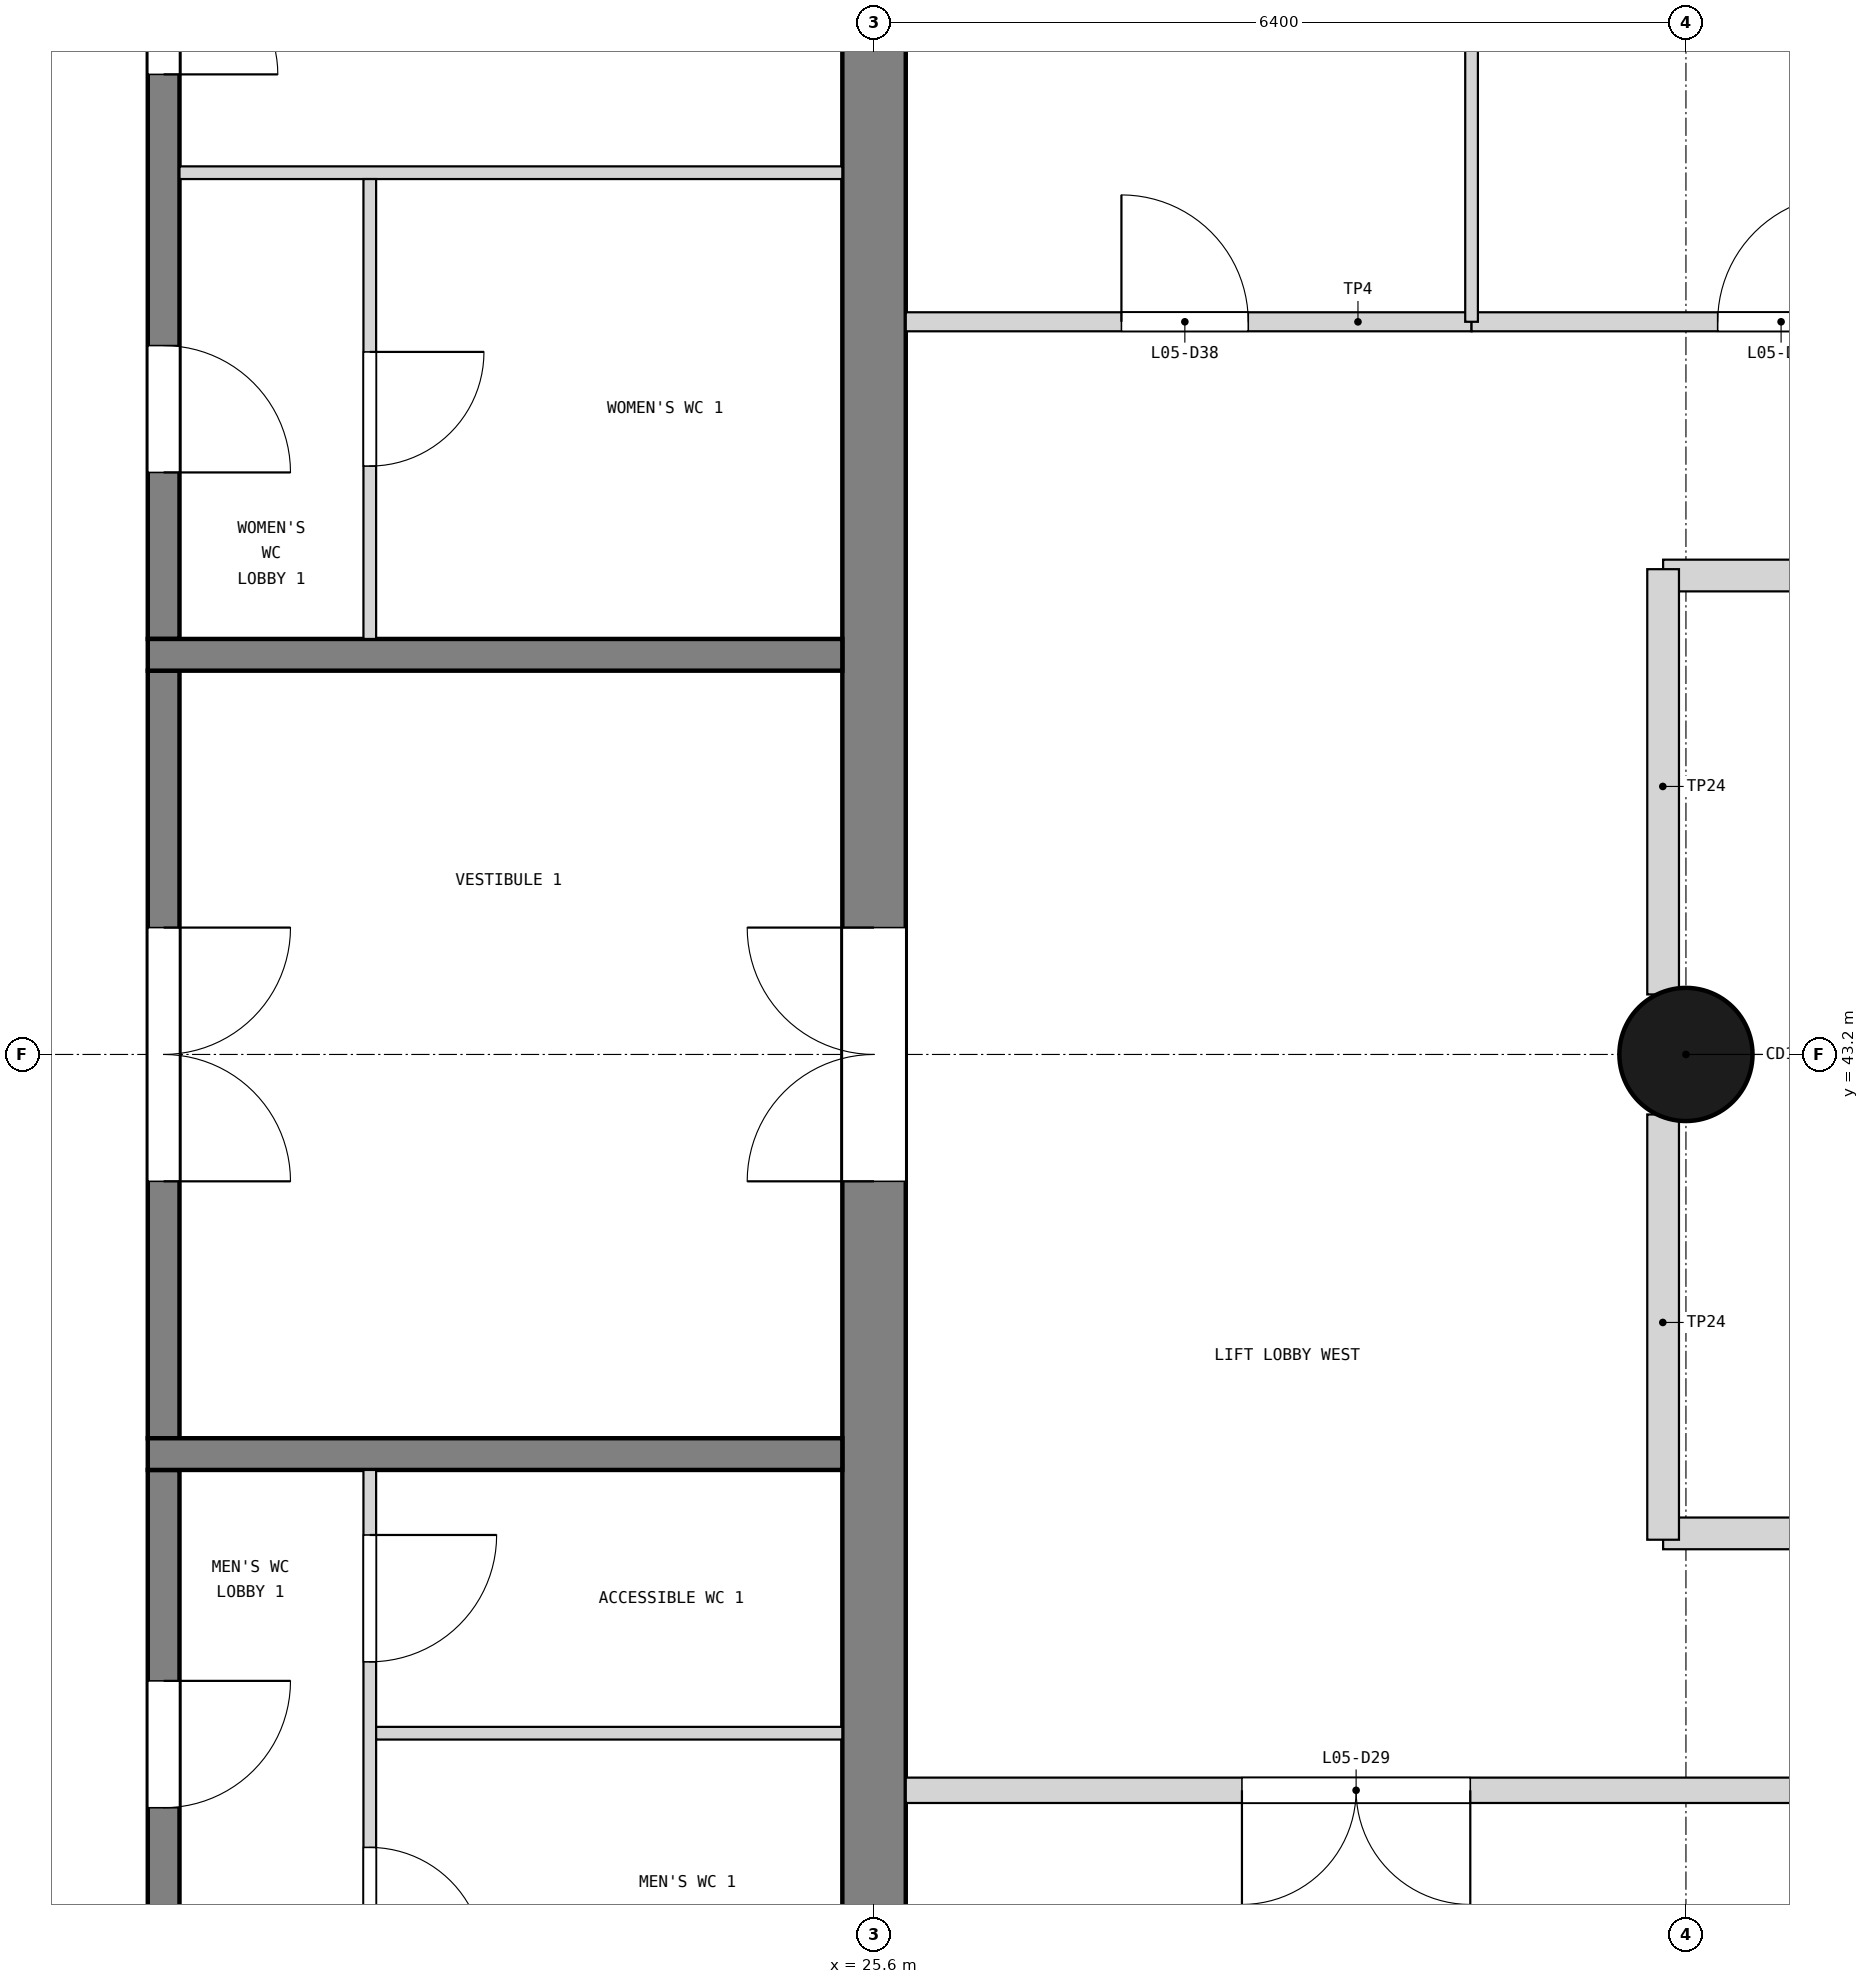
"""IFC4 building model, lengths in metres.
Left out: names, types, materials, properties, quantities, classifications, styles, units other than length and angle.
Written with IfcOpenShell. Run it as: python <this file> out.ifc"""

import sys

from ifc_helpers import new_model, si_unit, direction, frame, frame_2d, origin, origin_2d, place, context, subcontext, project, spatial, rectangle, circle, extrude, element, fill, save


model = new_model("IFC4")
c1 = context("Model", 3, precision=1e-05, world=origin(), true_north=direction((0.0, 1.0)))
c2 = subcontext(c1, "Body", "Model", "MODEL_VIEW")
j1 = project(units=[si_unit("LENGTHUNIT", "METRE"), si_unit("PLANEANGLEUNIT", "RADIAN")], contexts=[c1])
p1 = place(None, origin())
s1 = spatial("IfcSite", under=j1, at=p1, CompositionType="ELEMENT")
p2 = place(p1, origin())
s2 = spatial("IfcBuilding", under=s1, at=p2, CompositionType="ELEMENT")
p3 = place(p2, frame((0.0, 0.0, 21.0)))
s3 = spatial("IfcBuildingStorey", under=s2, at=p3, CompositionType="ELEMENT", Elevation=21.0)
p4 = place(p3, frame((25.6, 33.85, 0.0), z_axis=(0.0, 0.0, 1.0), x_axis=(0.0, 1.0, 0.0)))
e1 = element("IfcWall", 1, at=p4, inside=s3, PredefinedType="SHEAR", context=c2, shape_type="SweptSolid", body=[
    extrude(rectangle(XDim=18.7, YDim=0.5, at=frame_2d((9.35, 0.0))), origin(), (0.0, 0.0, 1.0), 3.9),
])
p5 = place(p4, frame((8.35, 0.0, 0.0)))
e2 = element("IfcOpeningElement", 2, at=p5, cuts=e1, PredefinedType="OPENING", context=c2, shape_type="SweptSolid", body=[
    extrude(rectangle(XDim=2.0, YDim=2.1, at=frame_2d((1.0, 1.05))), frame((0.0, 0.26, 0.0), z_axis=(0.0, -1.0, 0.0), x_axis=(1.0, 0.0, 0.0)), (0.0, 0.0, 1.0), 0.52),
])
p6 = place(p3, frame((32.0, 43.2, 0.0), z_axis=(0.0, 0.0, 1.0), x_axis=(1.0, 0.0, 0.0)))
e3 = element("IfcColumn", 3, at=p6, inside=s3, PredefinedType="COLUMN", context=c2, shape_type="SweptSolid", body=[
    extrude(circle(Radius=0.525, at=origin_2d()), origin(), (0.0, 0.0, 1.0), 3.9),
])
p7 = place(p3, frame((20.0, 33.85, 0.0), z_axis=(0.0, 0.0, 1.0), x_axis=(0.0, 1.0, 0.0)))
e4 = element("IfcWall", 4, at=p7, inside=s3, PredefinedType="SOLIDWALL", context=c2, shape_type="SweptSolid", body=[
    extrude(rectangle(XDim=6.075, YDim=0.25, at=frame_2d((3.038, 0.0))), origin(), (0.0, 0.0, 1.0), 3.6),
])
p8 = place(p7, frame((0.425, 0.0, 0.0)))
e5 = element("IfcOpeningElement", 5, at=p8, cuts=e4, PredefinedType="OPENING", context=c2, shape_type="SweptSolid", body=[
    extrude(rectangle(XDim=0.8, YDim=2.1, at=frame_2d((0.4, 1.05))), frame((0.0, 0.135, 0.0), z_axis=(0.0, -1.0, 0.0), x_axis=(1.0, 0.0, 0.0)), (0.0, 0.0, 1.0), 0.27),
])
p9 = place(p7, frame((3.413, 0.0, 0.0)))
e6 = element("IfcOpeningElement", 6, at=p9, cuts=e4, PredefinedType="OPENING", context=c2, shape_type="SweptSolid", body=[
    extrude(rectangle(XDim=1.0, YDim=2.1, at=frame_2d((0.5, 1.05))), frame((0.0, 0.135, 0.0), z_axis=(0.0, -1.0, 0.0), x_axis=(1.0, 0.0, 0.0)), (0.0, 0.0, 1.0), 0.27),
])
p10 = place(p3, frame((20.0, 40.175, 0.0), z_axis=(0.0, 0.0, 1.0), x_axis=(0.0, 1.0, 0.0)))
e7 = element("IfcWall", 7, at=p10, inside=s3, PredefinedType="SOLIDWALL", context=c2, shape_type="SweptSolid", body=[
    extrude(rectangle(XDim=6.05, YDim=0.25, at=frame_2d((3.025, 0.0))), origin(), (0.0, 0.0, 1.0), 3.6),
])
p11 = place(p10, frame((2.025, 0.0, 0.0)))
e8 = element("IfcOpeningElement", 8, at=p11, cuts=e7, PredefinedType="OPENING", context=c2, shape_type="SweptSolid", body=[
    extrude(rectangle(XDim=2.0, YDim=2.1, at=frame_2d((1.0, 1.05))), frame((0.0, 0.135, 0.0), z_axis=(0.0, -1.0, 0.0), x_axis=(1.0, 0.0, 0.0)), (0.0, 0.0, 1.0), 0.27),
])
p12 = place(p3, frame((20.0, 46.475, 0.0), z_axis=(0.0, 0.0, 1.0), x_axis=(0.0, 1.0, 0.0)))
e9 = element("IfcWall", 9, at=p12, inside=s3, PredefinedType="SOLIDWALL", context=c2, shape_type="SweptSolid", body=[
    extrude(rectangle(XDim=6.075, YDim=0.25, at=frame_2d((3.038, 0.0))), origin(), (0.0, 0.0, 1.0), 3.6),
])
p13 = place(p12, frame((1.312, 0.0, 0.0)))
e10 = element("IfcOpeningElement", 10, at=p13, cuts=e9, PredefinedType="OPENING", context=c2, shape_type="SweptSolid", body=[
    extrude(rectangle(XDim=1.0, YDim=2.1, at=frame_2d((0.5, 1.05))), frame((0.0, 0.135, 0.0), z_axis=(0.0, -1.0, 0.0), x_axis=(1.0, 0.0, 0.0)), (0.0, 0.0, 1.0), 0.27),
])
p14 = place(p12, frame((4.45, 0.0, 0.0)))
e11 = element("IfcOpeningElement", 11, at=p14, cuts=e9, PredefinedType="OPENING", context=c2, shape_type="SweptSolid", body=[
    extrude(rectangle(XDim=0.9, YDim=2.1, at=frame_2d((0.45, 1.05))), frame((0.0, 0.135, 0.0), z_axis=(0.0, -1.0, 0.0), x_axis=(1.0, 0.0, 0.0)), (0.0, 0.0, 1.0), 0.27),
])
for number, where, z_axis, x_axis in (
    (12, (19.875, 40.05, 0.0), (0.0, 0.0, 1.0), (1.0, 0.0, 0.0)),
    (13, (19.875, 46.35, 0.0), (0.0, 0.0, 1.0), (1.0, 0.0, 0.0)),
):
    element("IfcWall", number, at=place(p3, frame(where, z_axis=z_axis, x_axis=x_axis)), inside=s3, PredefinedType="SOLIDWALL", context=c2, shape_type="SweptSolid", body=[
        extrude(rectangle(XDim=5.475, YDim=0.25, at=frame_2d((2.738, 0.0))), origin(), (0.0, 0.0, 1.0), 3.6),
    ])
p15 = place(p3, frame((21.625, 35.6, 0.0), z_axis=(0.0, 0.0, 1.0), x_axis=(0.0, 1.0, 0.0)))
e14 = element("IfcWall", 14, at=p15, inside=s3, PredefinedType="PARTITIONING", context=c2, shape_type="SweptSolid", body=[
    extrude(rectangle(XDim=4.325, YDim=0.1, at=frame_2d((2.163, 0.0))), origin(), (0.0, 0.0, 1.0), 3.6),
])
p16 = place(p15, frame((0.45, 0.0, 0.0)))
e15 = element("IfcOpeningElement", 15, at=p16, cuts=e14, PredefinedType="OPENING", context=c2, shape_type="SweptSolid", body=[
    extrude(rectangle(XDim=0.9, YDim=2.1, at=frame_2d((0.45, 1.05))), frame((0.0, 0.06, 0.0), z_axis=(0.0, -1.0, 0.0), x_axis=(1.0, 0.0, 0.0)), (0.0, 0.0, 1.0), 0.12),
])
p17 = place(p15, frame((2.812, 0.0, 0.0)))
e16 = element("IfcOpeningElement", 16, at=p17, cuts=e14, PredefinedType="OPENING", context=c2, shape_type="SweptSolid", body=[
    extrude(rectangle(XDim=1.0, YDim=2.1, at=frame_2d((0.5, 1.05))), frame((0.0, 0.06, 0.0), z_axis=(0.0, -1.0, 0.0), x_axis=(1.0, 0.0, 0.0)), (0.0, 0.0, 1.0), 0.12),
])
p18 = place(p3, frame((21.675, 37.85, 0.0), z_axis=(0.0, 0.0, 1.0), x_axis=(1.0, 0.0, 0.0)))
e17 = element("IfcWall", 17, at=p18, inside=s3, PredefinedType="PARTITIONING", context=c2, shape_type="SweptSolid", body=[
    extrude(rectangle(XDim=3.675, YDim=0.1, at=frame_2d((1.837, 0.0))), origin(), (0.0, 0.0, 1.0), 3.6),
])
p19 = place(p3, frame((20.125, 50.15, 0.0), z_axis=(0.0, 0.0, 1.0), x_axis=(1.0, 0.0, 0.0)))
e18 = element("IfcWall", 18, at=p19, inside=s3, PredefinedType="PARTITIONING", context=c2, shape_type="SweptSolid", body=[
    extrude(rectangle(XDim=5.225, YDim=0.1, at=frame_2d((2.613, 0.0))), origin(), (0.0, 0.0, 1.0), 3.6),
])
p20 = place(p3, frame((21.625, 46.475, 0.0), z_axis=(0.0, 0.0, 1.0), x_axis=(0.0, 1.0, 0.0)))
e19 = element("IfcWall", 19, at=p20, inside=s3, PredefinedType="PARTITIONING", context=c2, shape_type="SweptSolid", body=[
    extrude(rectangle(XDim=3.625, YDim=0.1, at=frame_2d((1.812, 0.0))), origin(), (0.0, 0.0, 1.0), 3.6),
])
p21 = place(p20, frame((1.363, 0.0, 0.0)))
e20 = element("IfcOpeningElement", 20, at=p21, cuts=e19, PredefinedType="OPENING", context=c2, shape_type="SweptSolid", body=[
    extrude(rectangle(XDim=0.9, YDim=2.1, at=frame_2d((0.45, 1.05))), frame((0.0, 0.06, 0.0), z_axis=(0.0, -1.0, 0.0), x_axis=(1.0, 0.0, 0.0)), (0.0, 0.0, 1.0), 0.12),
])
p22 = place(p3, frame((25.85, 37.4, 0.0), z_axis=(0.0, 0.0, 1.0), x_axis=(1.0, 0.0, 0.0)))
e21 = element("IfcWall", 21, at=p22, inside=s3, PredefinedType="PARTITIONING", context=c2, shape_type="SweptSolid", body=[
    extrude(rectangle(XDim=14.24, YDim=0.2, at=frame_2d((7.12, 0.0))), origin(), (0.0, 0.0, 1.0), 3.68),
])
p23 = place(p22, frame((2.65, 0.0, 0.0)))
e22 = element("IfcOpeningElement", 22, at=p23, cuts=e21, PredefinedType="OPENING", context=c2, shape_type="SweptSolid", body=[
    extrude(rectangle(XDim=1.8, YDim=2.1, at=frame_2d((0.9, 1.05))), frame((0.0, 0.11, 0.0), z_axis=(0.0, -1.0, 0.0), x_axis=(1.0, 0.0, 0.0)), (0.0, 0.0, 1.0), 0.22),
])
p24 = place(p22, frame((9.7, 0.0, 0.0)))
e23 = element("IfcOpeningElement", 23, at=p24, cuts=e21, PredefinedType="OPENING", context=c2, shape_type="SweptSolid", body=[
    extrude(rectangle(XDim=1.8, YDim=2.1, at=frame_2d((0.9, 1.05))), frame((0.0, 0.11, 0.0), z_axis=(0.0, -1.0, 0.0), x_axis=(1.0, 0.0, 0.0)), (0.0, 0.0, 1.0), 0.22),
])
p25 = place(p3, frame((31.82, 39.425, 0.0), z_axis=(0.0, 0.0, 1.0), x_axis=(1.0, 0.0, 0.0)))
e24 = element("IfcWall", 24, at=p25, inside=s3, PredefinedType="PARTITIONING", context=c2, shape_type="SweptSolid", body=[
    extrude(rectangle(XDim=8.27, YDim=0.25, at=frame_2d((4.135, 0.0))), origin(), (0.0, 0.0, 1.0), 3.68),
])
p26 = place(p25, frame((3.53, 0.0, 0.0)))
e25 = element("IfcOpeningElement", 25, at=p26, cuts=e24, PredefinedType="OPENING", context=c2, shape_type="SweptSolid", body=[
    extrude(rectangle(XDim=1.2, YDim=2.1, at=frame_2d((0.6, 1.05))), frame((0.0, 0.135, 0.0), z_axis=(0.0, -1.0, 0.0), x_axis=(1.0, 0.0, 0.0)), (0.0, 0.0, 1.0), 0.27),
])
p27 = place(p3, frame((31.82, 46.975, 0.0), z_axis=(0.0, 0.0, 1.0), x_axis=(1.0, 0.0, 0.0)))
e26 = element("IfcWall", 26, at=p27, inside=s3, PredefinedType="PARTITIONING", context=c2, shape_type="SweptSolid", body=[
    extrude(rectangle(XDim=8.27, YDim=0.25, at=frame_2d((4.135, 0.0))), origin(), (0.0, 0.0, 1.0), 3.68),
])
p28 = place(p3, frame((25.85, 48.975, 0.0), z_axis=(0.0, 0.0, 1.0), x_axis=(1.0, 0.0, 0.0)))
e27 = element("IfcWall", 27, at=p28, inside=s3, PredefinedType="PARTITIONING", context=c2, shape_type="SweptSolid", body=[
    extrude(rectangle(XDim=4.46, YDim=0.15, at=frame_2d((2.23, 0.0))), origin(), (0.0, 0.0, 1.0), 3.68),
])
p29 = place(p28, frame((1.7, 0.0, 0.0)))
e28 = element("IfcOpeningElement", 28, at=p29, cuts=e27, PredefinedType="OPENING", context=c2, shape_type="SweptSolid", body=[
    extrude(rectangle(XDim=1.0, YDim=2.1, at=frame_2d((0.5, 1.05))), frame((0.0, 0.085, 0.0), z_axis=(0.0, -1.0, 0.0), x_axis=(1.0, 0.0, 0.0)), (0.0, 0.0, 1.0), 0.17),
])
p30 = place(p3, frame((30.31, 48.975, 0.0), z_axis=(0.0, 0.0, 1.0), x_axis=(1.0, 0.0, 0.0)))
e29 = element("IfcWall", 29, at=p30, inside=s3, PredefinedType="PARTITIONING", context=c2, shape_type="SweptSolid", body=[
    extrude(rectangle(XDim=4.89, YDim=0.15, at=frame_2d((2.445, 0.0))), origin(), (0.0, 0.0, 1.0), 3.68),
])
p31 = place(p30, frame((1.94, 0.0, 0.0)))
e30 = element("IfcOpeningElement", 30, at=p31, cuts=e29, PredefinedType="OPENING", context=c2, shape_type="SweptSolid", body=[
    extrude(rectangle(XDim=1.0, YDim=2.1, at=frame_2d((0.5, 1.05))), frame((0.0, 0.085, 0.0), z_axis=(0.0, -1.0, 0.0), x_axis=(1.0, 0.0, 0.0)), (0.0, 0.0, 1.0), 0.17),
])
p32 = place(p3, frame((30.31, 48.975, 0.0), z_axis=(0.0, 0.0, 1.0), x_axis=(0.0, 1.0, 0.0)))
e31 = element("IfcWall", 31, at=p32, inside=s3, PredefinedType="PARTITIONING", context=c2, shape_type="SweptSolid", body=[
    extrude(rectangle(XDim=6.125, YDim=0.1, at=frame_2d((3.062, 0.0))), origin(), (0.0, 0.0, 1.0), 3.68),
])
for number, where, z_axis, x_axis in (
    (32, (31.82, 39.375, 0.0), (0.0, 0.0, 1.0), (0.0, 1.0, 0.0)),
    (33, (31.82, 43.673, 0.0), (0.0, 0.0, 1.0), (0.0, 1.0, 0.0)),
):
    element("IfcWall", number, at=place(p3, frame(where, z_axis=z_axis, x_axis=x_axis)), inside=s3, PredefinedType="PARTITIONING", context=c2, shape_type="SweptSolid", body=[
        extrude(rectangle(XDim=3.352, YDim=0.25, at=frame_2d((1.676, 0.0))), origin(), (0.0, 0.0, 1.0), 2.78),
    ])
p33 = place(p11, frame((2.0, 0.0, 0.0), z_axis=(0.0, 0.0, 1.0), x_axis=(-1.0, 0.0, 0.0)))
e34 = element("IfcDoor", 34, at=p33, inside=s3, OperationType="DOUBLE_DOOR_SINGLE_SWING", PredefinedType="DOOR", context=c2, shape_type="SweptSolid", body=[
    extrude(rectangle(XDim=2.0, YDim=2.1, at=frame_2d((1.0, 1.05))), frame((0.0, 0.025, 0.0), z_axis=(0.0, -1.0, 0.0), x_axis=(1.0, 0.0, 0.0)), (0.0, 0.0, 1.0), 0.05),
])
fill(e8, e34)
p34 = place(p5, origin())
e35 = element("IfcDoor", 35, at=p34, inside=s3, OperationType="DOUBLE_DOOR_SINGLE_SWING", PredefinedType="DOOR", context=c2, shape_type="SweptSolid", body=[
    extrude(rectangle(XDim=2.0, YDim=2.1, at=frame_2d((1.0, 1.05))), frame((0.0, 0.025, 0.0), z_axis=(0.0, -1.0, 0.0), x_axis=(1.0, 0.0, 0.0)), (0.0, 0.0, 1.0), 0.05),
])
fill(e2, e35)
p35 = place(p9, frame((1.0, 0.0, 0.0), z_axis=(0.0, 0.0, 1.0), x_axis=(-1.0, 0.0, 0.0)))
e36 = element("IfcDoor", 36, at=p35, inside=s3, OperationType="SINGLE_SWING_LEFT", PredefinedType="DOOR", context=c2, shape_type="SweptSolid", body=[
    extrude(rectangle(XDim=1.0, YDim=2.1, at=frame_2d((0.5, 1.05))), frame((0.0, 0.025, 0.0), z_axis=(0.0, -1.0, 0.0), x_axis=(1.0, 0.0, 0.0)), (0.0, 0.0, 1.0), 0.05),
])
fill(e6, e36)
p36 = place(p16, frame((0.9, 0.0, 0.0), z_axis=(0.0, 0.0, 1.0), x_axis=(-1.0, 0.0, 0.0)))
e37 = element("IfcDoor", 37, at=p36, inside=s3, OperationType="SINGLE_SWING_RIGHT", PredefinedType="DOOR", context=c2, shape_type="SweptSolid", body=[
    extrude(rectangle(XDim=0.9, YDim=2.1, at=frame_2d((0.45, 1.05))), frame((0.0, 0.025, 0.0), z_axis=(0.0, -1.0, 0.0), x_axis=(1.0, 0.0, 0.0)), (0.0, 0.0, 1.0), 0.05),
])
fill(e15, e37)
p37 = place(p17, frame((1.0, 0.0, 0.0), z_axis=(0.0, 0.0, 1.0), x_axis=(-1.0, 0.0, 0.0)))
e38 = element("IfcDoor", 38, at=p37, inside=s3, OperationType="SINGLE_SWING_LEFT", PredefinedType="DOOR", context=c2, shape_type="SweptSolid", body=[
    extrude(rectangle(XDim=1.0, YDim=2.1, at=frame_2d((0.5, 1.05))), frame((0.0, 0.025, 0.0), z_axis=(0.0, -1.0, 0.0), x_axis=(1.0, 0.0, 0.0)), (0.0, 0.0, 1.0), 0.05),
])
fill(e16, e38)
p38 = place(p13, frame((1.0, 0.0, 0.0), z_axis=(0.0, 0.0, 1.0), x_axis=(-1.0, 0.0, 0.0)))
e39 = element("IfcDoor", 39, at=p38, inside=s3, OperationType="SINGLE_SWING_RIGHT", PredefinedType="DOOR", context=c2, shape_type="SweptSolid", body=[
    extrude(rectangle(XDim=1.0, YDim=2.1, at=frame_2d((0.5, 1.05))), frame((0.0, 0.025, 0.0), z_axis=(0.0, -1.0, 0.0), x_axis=(1.0, 0.0, 0.0)), (0.0, 0.0, 1.0), 0.05),
])
fill(e10, e39)
p39 = place(p21, frame((0.9, 0.0, 0.0), z_axis=(0.0, 0.0, 1.0), x_axis=(-1.0, 0.0, 0.0)))
e40 = element("IfcDoor", 40, at=p39, inside=s3, OperationType="SINGLE_SWING_LEFT", PredefinedType="DOOR", context=c2, shape_type="SweptSolid", body=[
    extrude(rectangle(XDim=0.9, YDim=2.1, at=frame_2d((0.45, 1.05))), frame((0.0, 0.025, 0.0), z_axis=(0.0, -1.0, 0.0), x_axis=(1.0, 0.0, 0.0)), (0.0, 0.0, 1.0), 0.05),
])
fill(e20, e40)
p40 = place(p14, frame((0.9, 0.0, 0.0), z_axis=(0.0, 0.0, 1.0), x_axis=(-1.0, 0.0, 0.0)))
e41 = element("IfcDoor", 41, at=p40, inside=s3, OperationType="SINGLE_SWING_RIGHT", PredefinedType="DOOR", context=c2, shape_type="SweptSolid", body=[
    extrude(rectangle(XDim=0.9, YDim=2.1, at=frame_2d((0.45, 1.05))), frame((0.0, 0.025, 0.0), z_axis=(0.0, -1.0, 0.0), x_axis=(1.0, 0.0, 0.0)), (0.0, 0.0, 1.0), 0.05),
])
fill(e11, e41)
p41 = place(p23, frame((1.8, 0.0, 0.0), z_axis=(0.0, 0.0, 1.0), x_axis=(-1.0, 0.0, 0.0)))
e42 = element("IfcDoor", 42, at=p41, inside=s3, OperationType="DOUBLE_DOOR_SINGLE_SWING", PredefinedType="DOOR", context=c2, shape_type="SweptSolid", body=[
    extrude(rectangle(XDim=1.8, YDim=2.1, at=frame_2d((0.9, 1.05))), frame((0.0, 0.025, 0.0), z_axis=(0.0, -1.0, 0.0), x_axis=(1.0, 0.0, 0.0)), (0.0, 0.0, 1.0), 0.05),
])
fill(e22, e42)
p42 = place(p29, origin())
e43 = element("IfcDoor", 43, at=p42, inside=s3, OperationType="SINGLE_SWING_LEFT", PredefinedType="DOOR", context=c2, shape_type="SweptSolid", body=[
    extrude(rectangle(XDim=1.0, YDim=2.1, at=frame_2d((0.5, 1.05))), frame((0.0, 0.025, 0.0), z_axis=(0.0, -1.0, 0.0), x_axis=(1.0, 0.0, 0.0)), (0.0, 0.0, 1.0), 0.05),
])
fill(e28, e43)
p43 = place(p31, origin())
e44 = element("IfcDoor", 44, at=p43, inside=s3, OperationType="SINGLE_SWING_RIGHT", PredefinedType="DOOR", context=c2, shape_type="SweptSolid", body=[
    extrude(rectangle(XDim=1.0, YDim=2.1, at=frame_2d((0.5, 1.05))), frame((0.0, 0.025, 0.0), z_axis=(0.0, -1.0, 0.0), x_axis=(1.0, 0.0, 0.0)), (0.0, 0.0, 1.0), 0.05),
])
fill(e30, e44)
save(model, sys.argv[1])
